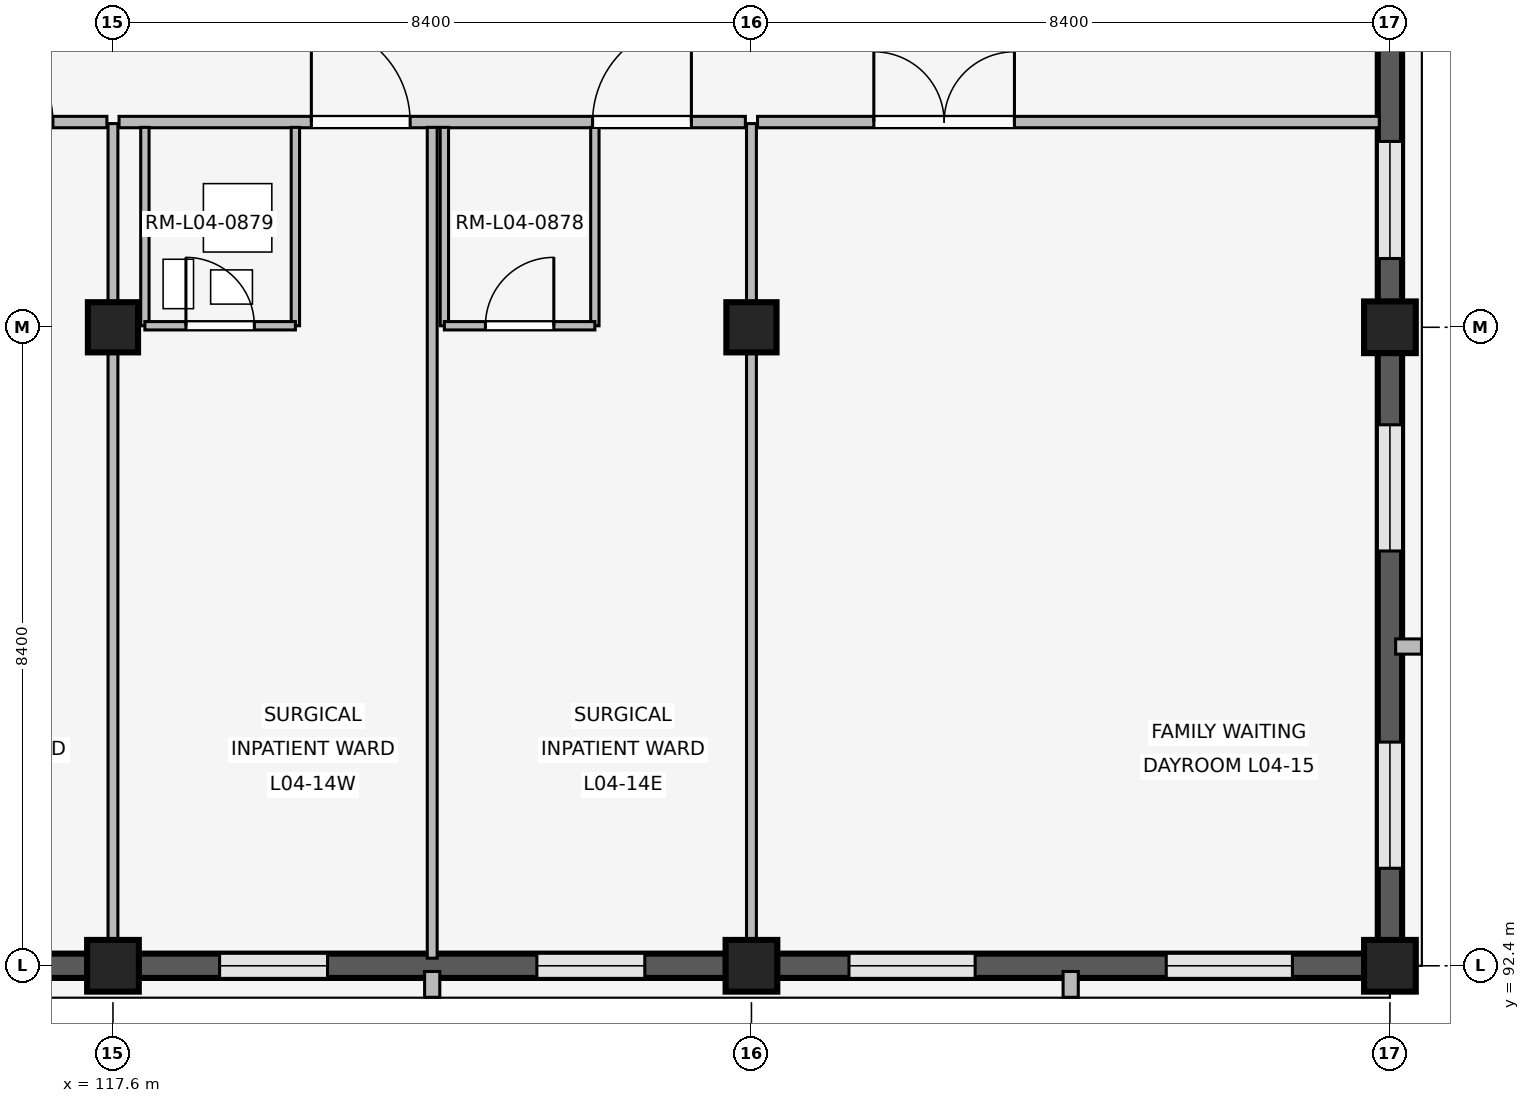
"""IFC4 building model, lengths in metres.
Left out: names, types, materials, properties, quantities, classifications, styles, units other than length and angle.
Written with IfcOpenShell. Run it as: python <this file> out.ifc"""

import sys

from ifc_helpers import new_model, si_unit, direction, frame, frame_2d, origin, origin_2d, place, context, subcontext, project, spatial, rectangle, extrude, element, fill, save


model = new_model("IFC4")
c1 = context("Model", 3, precision=1e-05, world=origin(), true_north=direction((0.0, 1.0)))
c2 = subcontext(c1, "Body", "Model", "MODEL_VIEW")
j1 = project(units=[si_unit("LENGTHUNIT", "METRE"), si_unit("PLANEANGLEUNIT", "RADIAN")], contexts=[c1])
p1 = place(None, origin())
s1 = spatial("IfcSite", under=j1, at=p1, CompositionType="ELEMENT")
p2 = place(p1, origin())
s2 = spatial("IfcBuilding", under=s1, at=p2, CompositionType="ELEMENT")
p3 = place(p2, frame((0.0, 0.0, 16.2)))
s3 = spatial("IfcBuildingStorey", under=s2, at=p3, CompositionType="ELEMENT", Elevation=16.2)
p4 = place(p3, frame((117.6, 92.4, 0.0), z_axis=(0.0, 0.0, 1.0), x_axis=(1.0, 0.0, 0.0)))
e1 = element("IfcColumn", 1, at=p4, inside=s3, PredefinedType="COLUMN", context=c2, shape_type="SweptSolid", body=[
    extrude(rectangle(XDim=0.68, YDim=0.68, at=origin_2d()), origin(), (0.0, 0.0, 1.0), 4.2),
])
p5 = place(p3, frame((117.6, 100.8, 0.0), z_axis=(0.0, 0.0, 1.0), x_axis=(1.0, 0.0, 0.0)))
e2 = element("IfcColumn", 2, at=p5, inside=s3, PredefinedType="COLUMN", context=c2, shape_type="SweptSolid", body=[
    extrude(rectangle(XDim=0.66, YDim=0.66, at=origin_2d()), origin(), (0.0, 0.0, 1.0), 4.2),
])
p6 = place(p3, frame((126.0, 92.4, 0.0), z_axis=(0.0, 0.0, 1.0), x_axis=(1.0, 0.0, 0.0)))
e3 = element("IfcColumn", 3, at=p6, inside=s3, PredefinedType="COLUMN", context=c2, shape_type="SweptSolid", body=[
    extrude(rectangle(XDim=0.68, YDim=0.68, at=origin_2d()), origin(), (0.0, 0.0, 1.0), 4.2),
])
p7 = place(p3, frame((126.0, 100.8, 0.0), z_axis=(0.0, 0.0, 1.0), x_axis=(1.0, 0.0, 0.0)))
e4 = element("IfcColumn", 4, at=p7, inside=s3, PredefinedType="COLUMN", context=c2, shape_type="SweptSolid", body=[
    extrude(rectangle(XDim=0.66, YDim=0.66, at=origin_2d()), origin(), (0.0, 0.0, 1.0), 4.2),
])
for number, where, z_axis, x_axis in (
    (5, (134.4, 92.4, 0.0), (0.0, 0.0, 1.0), (1.0, 0.0, 0.0)),
    (6, (134.4, 100.8, 0.0), (0.0, 0.0, 1.0), (1.0, 0.0, 0.0)),
):
    element("IfcColumn", number, at=place(p3, frame(where, z_axis=z_axis, x_axis=x_axis)), inside=s3, PredefinedType="COLUMN", context=c2, shape_type="SweptSolid", body=[
        extrude(rectangle(XDim=0.68, YDim=0.68, at=origin_2d()), origin(), (0.0, 0.0, 1.0), 4.2),
    ])
p8 = place(p3, frame((117.265, 92.4, 0.0), z_axis=(0.0, 0.0, 1.0), x_axis=(-1.0, 0.0, 0.0)))
e7 = element("IfcWall", 7, at=p8, inside=s3, PredefinedType="SOLIDWALL", context=c2, shape_type="SweptSolid", body=[
    extrude(rectangle(XDim=7.73, YDim=0.32, at=frame_2d((3.865, 0.0))), origin(), (0.0, 0.0, 1.0), 3.32),
])
p9 = place(p8, frame((1.038, 0.0, 0.85)))
e8 = element("IfcOpeningElement", 8, at=p9, cuts=e7, PredefinedType="OPENING", context=c2, shape_type="SweptSolid", body=[
    extrude(rectangle(XDim=1.48, YDim=1.6, at=frame_2d((0.74, 0.8))), frame((0.0, 0.17, 0.0), z_axis=(0.0, -1.0, 0.0), x_axis=(1.0, 0.0, 0.0)), (0.0, 0.0, 1.0), 0.34),
])
p10 = place(p8, frame((5.212, 0.0, 0.85)))
e9 = element("IfcOpeningElement", 9, at=p10, cuts=e7, PredefinedType="OPENING", context=c2, shape_type="SweptSolid", body=[
    extrude(rectangle(XDim=1.48, YDim=1.6, at=frame_2d((0.74, 0.8))), frame((0.0, 0.17, 0.0), z_axis=(0.0, -1.0, 0.0), x_axis=(1.0, 0.0, 0.0)), (0.0, 0.0, 1.0), 0.34),
])
p11 = place(p3, frame((125.665, 92.4, 0.0), z_axis=(0.0, 0.0, 1.0), x_axis=(-1.0, 0.0, 0.0)))
e10 = element("IfcWall", 10, at=p11, inside=s3, PredefinedType="SOLIDWALL", context=c2, shape_type="SweptSolid", body=[
    extrude(rectangle(XDim=7.73, YDim=0.32, at=frame_2d((3.865, 0.0))), origin(), (0.0, 0.0, 1.0), 3.32),
])
p12 = place(p11, frame((1.068, 0.0, 0.85)))
e11 = element("IfcOpeningElement", 11, at=p12, cuts=e10, PredefinedType="OPENING", context=c2, shape_type="SweptSolid", body=[
    extrude(rectangle(XDim=1.42, YDim=1.45, at=frame_2d((0.71, 0.725))), frame((0.0, 0.17, 0.0), z_axis=(0.0, -1.0, 0.0), x_axis=(1.0, 0.0, 0.0)), (0.0, 0.0, 1.0), 0.34),
])
p13 = place(p11, frame((5.242, 0.0, 0.85)))
e12 = element("IfcOpeningElement", 12, at=p13, cuts=e10, PredefinedType="OPENING", context=c2, shape_type="SweptSolid", body=[
    extrude(rectangle(XDim=1.42, YDim=1.45, at=frame_2d((0.71, 0.725))), frame((0.0, 0.17, 0.0), z_axis=(0.0, -1.0, 0.0), x_axis=(1.0, 0.0, 0.0)), (0.0, 0.0, 1.0), 0.34),
])
p14 = place(p3, frame((121.8, 92.325, 0.0), z_axis=(0.0, 0.0, 1.0), x_axis=(0.0, -1.0, 0.0)))
e13 = element("IfcWall", 13, at=p14, inside=s3, PredefinedType="ELEMENTEDWALL", context=c2, shape_type="SweptSolid", body=[
    extrude(rectangle(XDim=0.34, YDim=0.2, at=frame_2d((0.17, 0.0))), origin(), (0.0, 0.0, 1.0), 3.3),
])
p15 = place(p3, frame((134.065, 92.4, 0.0), z_axis=(0.0, 0.0, 1.0), x_axis=(-1.0, 0.0, 0.0)))
e14 = element("IfcWall", 14, at=p15, inside=s3, PredefinedType="SOLIDWALL", context=c2, shape_type="SweptSolid", body=[
    extrude(rectangle(XDim=7.73, YDim=0.32, at=frame_2d((3.865, 0.0))), origin(), (0.0, 0.0, 1.0), 3.32),
])
p16 = place(p15, frame((0.948, 0.0, 0.85)))
e15 = element("IfcOpeningElement", 15, at=p16, cuts=e14, PredefinedType="OPENING", context=c2, shape_type="SweptSolid", body=[
    extrude(rectangle(XDim=1.66, YDim=1.95, at=frame_2d((0.83, 0.975))), frame((0.0, 0.17, 0.0), z_axis=(0.0, -1.0, 0.0), x_axis=(1.0, 0.0, 0.0)), (0.0, 0.0, 1.0), 0.34),
])
p17 = place(p15, frame((5.122, 0.0, 0.85)))
e16 = element("IfcOpeningElement", 16, at=p17, cuts=e14, PredefinedType="OPENING", context=c2, shape_type="SweptSolid", body=[
    extrude(rectangle(XDim=1.66, YDim=1.95, at=frame_2d((0.83, 0.975))), frame((0.0, 0.17, 0.0), z_axis=(0.0, -1.0, 0.0), x_axis=(1.0, 0.0, 0.0)), (0.0, 0.0, 1.0), 0.34),
])
p18 = place(p3, frame((130.2, 92.325, 0.0), z_axis=(0.0, 0.0, 1.0), x_axis=(0.0, -1.0, 0.0)))
e17 = element("IfcWall", 17, at=p18, inside=s3, PredefinedType="ELEMENTEDWALL", context=c2, shape_type="SweptSolid", body=[
    extrude(rectangle(XDim=0.34, YDim=0.2, at=frame_2d((0.17, 0.0))), origin(), (0.0, 0.0, 1.0), 3.3),
])
p19 = place(p3, frame((134.4, 100.465, 0.0), z_axis=(0.0, 0.0, 1.0), x_axis=(0.0, -1.0, 0.0)))
e18 = element("IfcWall", 18, at=p19, inside=s3, PredefinedType="SOLIDWALL", context=c2, shape_type="SweptSolid", body=[
    extrude(rectangle(XDim=7.73, YDim=0.32, at=frame_2d((3.865, 0.0))), origin(), (0.0, 0.0, 1.0), 3.32),
])
p20 = place(p19, frame((0.948, 0.0, 0.85)))
e19 = element("IfcOpeningElement", 19, at=p20, cuts=e18, PredefinedType="OPENING", context=c2, shape_type="SweptSolid", body=[
    extrude(rectangle(XDim=1.66, YDim=1.95, at=frame_2d((0.83, 0.975))), frame((0.0, 0.17, 0.0), z_axis=(0.0, -1.0, 0.0), x_axis=(1.0, 0.0, 0.0)), (0.0, 0.0, 1.0), 0.34),
])
p21 = place(p19, frame((5.122, 0.0, 0.85)))
e20 = element("IfcOpeningElement", 20, at=p21, cuts=e18, PredefinedType="OPENING", context=c2, shape_type="SweptSolid", body=[
    extrude(rectangle(XDim=1.66, YDim=1.95, at=frame_2d((0.83, 0.975))), frame((0.0, 0.17, 0.0), z_axis=(0.0, -1.0, 0.0), x_axis=(1.0, 0.0, 0.0)), (0.0, 0.0, 1.0), 0.34),
])
p22 = place(p3, frame((134.475, 96.6, 0.0), z_axis=(0.0, 0.0, 1.0), x_axis=(1.0, 0.0, 0.0)))
e21 = element("IfcWall", 21, at=p22, inside=s3, PredefinedType="ELEMENTEDWALL", context=c2, shape_type="SweptSolid", body=[
    extrude(rectangle(XDim=0.34, YDim=0.2, at=frame_2d((0.17, 0.0))), origin(), (0.0, 0.0, 1.0), 3.3),
])
p23 = place(p3, frame((134.4, 108.865, 0.0), z_axis=(0.0, 0.0, 1.0), x_axis=(0.0, -1.0, 0.0)))
e22 = element("IfcWall", 22, at=p23, inside=s3, PredefinedType="SOLIDWALL", context=c2, shape_type="SweptSolid", body=[
    extrude(rectangle(XDim=7.73, YDim=0.32, at=frame_2d((3.865, 0.0))), origin(), (0.0, 0.0, 1.0), 3.32),
])
p24 = place(p23, frame((0.57, 0.0, 0.85)))
e23 = element("IfcOpeningElement", 23, at=p24, cuts=e22, PredefinedType="OPENING", context=c2, shape_type="SweptSolid", body=[
    extrude(rectangle(XDim=1.54, YDim=1.85, at=frame_2d((0.77, 0.925))), frame((0.0, 0.17, 0.0), z_axis=(0.0, -1.0, 0.0), x_axis=(1.0, 0.0, 0.0)), (0.0, 0.0, 1.0), 0.34),
])
p25 = place(p23, frame((5.62, 0.0, 0.85)))
e24 = element("IfcOpeningElement", 24, at=p25, cuts=e22, PredefinedType="OPENING", context=c2, shape_type="SweptSolid", body=[
    extrude(rectangle(XDim=1.54, YDim=1.85, at=frame_2d((0.77, 0.925))), frame((0.0, 0.17, 0.0), z_axis=(0.0, -1.0, 0.0), x_axis=(1.0, 0.0, 0.0)), (0.0, 0.0, 1.0), 0.34),
])
p26 = place(p3, frame((109.28, 103.5, 0.0), z_axis=(0.0, 0.0, 1.0), x_axis=(1.0, 0.0, 0.0)))
e25 = element("IfcWall", 25, at=p26, inside=s3, PredefinedType="PARTITIONING", context=c2, shape_type="SweptSolid", body=[
    extrude(rectangle(XDim=8.24, YDim=0.15, at=frame_2d((4.12, 0.0))), origin(), (0.0, 0.0, 1.0), 3.3),
])
p27 = place(p26, frame((2.53, 0.0, 0.0)))
e26 = element("IfcOpeningElement", 26, at=p27, cuts=e25, PredefinedType="OPENING", context=c2, shape_type="SweptSolid", body=[
    extrude(rectangle(XDim=1.3, YDim=2.25, at=frame_2d((0.65, 1.125))), frame((0.0, 0.085, 0.0), z_axis=(0.0, -1.0, 0.0), x_axis=(1.0, 0.0, 0.0)), (0.0, 0.0, 1.0), 0.17),
])
p28 = place(p26, frame((6.23, 0.0, 0.0)))
e27 = element("IfcOpeningElement", 27, at=p28, cuts=e25, PredefinedType="OPENING", context=c2, shape_type="SweptSolid", body=[
    extrude(rectangle(XDim=1.3, YDim=2.25, at=frame_2d((0.65, 1.125))), frame((0.0, 0.085, 0.0), z_axis=(0.0, -1.0, 0.0), x_axis=(1.0, 0.0, 0.0)), (0.0, 0.0, 1.0), 0.17),
])
p29 = place(p3, frame((117.6, 92.54, 0.0), z_axis=(0.0, 0.0, 1.0), x_axis=(0.0, 1.0, 0.0)))
e28 = element("IfcWall", 28, at=p29, inside=s3, PredefinedType="PARTITIONING", context=c2, shape_type="SweptSolid", body=[
    extrude(rectangle(XDim=10.94, YDim=0.13, at=frame_2d((5.47, 0.0))), origin(), (0.0, 0.0, 1.0), 3.3),
])
p30 = place(p3, frame((117.68, 103.5, 0.0), z_axis=(0.0, 0.0, 1.0), x_axis=(1.0, 0.0, 0.0)))
e29 = element("IfcWall", 29, at=p30, inside=s3, PredefinedType="PARTITIONING", context=c2, shape_type="SweptSolid", body=[
    extrude(rectangle(XDim=8.24, YDim=0.15, at=frame_2d((4.12, 0.0))), origin(), (0.0, 0.0, 1.0), 3.3),
])
p31 = place(p30, frame((2.53, 0.0, 0.0)))
e30 = element("IfcOpeningElement", 30, at=p31, cuts=e29, PredefinedType="OPENING", context=c2, shape_type="SweptSolid", body=[
    extrude(rectangle(XDim=1.3, YDim=2.25, at=frame_2d((0.65, 1.125))), frame((0.0, 0.085, 0.0), z_axis=(0.0, -1.0, 0.0), x_axis=(1.0, 0.0, 0.0)), (0.0, 0.0, 1.0), 0.17),
])
p32 = place(p30, frame((6.23, 0.0, 0.0)))
e31 = element("IfcOpeningElement", 31, at=p32, cuts=e29, PredefinedType="OPENING", context=c2, shape_type="SweptSolid", body=[
    extrude(rectangle(XDim=1.3, YDim=2.25, at=frame_2d((0.65, 1.125))), frame((0.0, 0.085, 0.0), z_axis=(0.0, -1.0, 0.0), x_axis=(1.0, 0.0, 0.0)), (0.0, 0.0, 1.0), 0.17),
])
p33 = place(p3, frame((121.8, 92.5, 0.0), z_axis=(0.0, 0.0, 1.0), x_axis=(0.0, 1.0, 0.0)))
e32 = element("IfcWall", 32, at=p33, inside=s3, PredefinedType="PARTITIONING", context=c2, shape_type="SweptSolid", body=[
    extrude(rectangle(XDim=10.93, YDim=0.13, at=frame_2d((5.465, 0.0))), origin(), (0.0, 0.0, 1.0), 3.3),
])
for number, where, z_axis, x_axis in (
    (33, (118.02, 100.82, 0.0), (0.0, 0.0, 1.0), (0.0, 1.0, 0.0)),
    (34, (120.0, 100.82, 0.0), (0.0, 0.0, 1.0), (0.0, 1.0, 0.0)),
):
    element("IfcWall", number, at=place(p3, frame(where, z_axis=z_axis, x_axis=x_axis)), inside=s3, PredefinedType="PARTITIONING", context=c2, shape_type="SweptSolid", body=[
        extrude(rectangle(XDim=2.61, YDim=0.11, at=frame_2d((1.305, 0.0))), origin(), (0.0, 0.0, 1.0), 3.3),
    ])
p34 = place(p3, frame((118.02, 100.82, 0.0), z_axis=(0.0, 0.0, 1.0), x_axis=(1.0, 0.0, 0.0)))
e35 = element("IfcWall", 35, at=p34, inside=s3, PredefinedType="PARTITIONING", context=c2, shape_type="SweptSolid", body=[
    extrude(rectangle(XDim=1.98, YDim=0.11, at=frame_2d((0.99, 0.0))), origin(), (0.0, 0.0, 1.0), 3.3),
])
p35 = place(p34, frame((0.54, 0.0, 0.0)))
e36 = element("IfcOpeningElement", 36, at=p35, cuts=e35, PredefinedType="OPENING", context=c2, shape_type="SweptSolid", body=[
    extrude(rectangle(XDim=0.9, YDim=2.1, at=frame_2d((0.45, 1.05))), frame((0.0, 0.065, 0.0), z_axis=(0.0, -1.0, 0.0), x_axis=(1.0, 0.0, 0.0)), (0.0, 0.0, 1.0), 0.13),
])
for number, where, z_axis, x_axis in (
    (37, (121.96, 100.82, 0.0), (0.0, 0.0, 1.0), (0.0, 1.0, 0.0)),
    (38, (123.94, 100.82, 0.0), (0.0, 0.0, 1.0), (0.0, 1.0, 0.0)),
):
    element("IfcWall", number, at=place(p3, frame(where, z_axis=z_axis, x_axis=x_axis)), inside=s3, PredefinedType="PARTITIONING", context=c2, shape_type="SweptSolid", body=[
        extrude(rectangle(XDim=2.61, YDim=0.11, at=frame_2d((1.305, 0.0))), origin(), (0.0, 0.0, 1.0), 3.3),
    ])
p36 = place(p3, frame((121.96, 100.82, 0.0), z_axis=(0.0, 0.0, 1.0), x_axis=(1.0, 0.0, 0.0)))
e39 = element("IfcWall", 39, at=p36, inside=s3, PredefinedType="PARTITIONING", context=c2, shape_type="SweptSolid", body=[
    extrude(rectangle(XDim=1.98, YDim=0.11, at=frame_2d((0.99, 0.0))), origin(), (0.0, 0.0, 1.0), 3.3),
])
p37 = place(p36, frame((0.54, 0.0, 0.0)))
e40 = element("IfcOpeningElement", 40, at=p37, cuts=e39, PredefinedType="OPENING", context=c2, shape_type="SweptSolid", body=[
    extrude(rectangle(XDim=0.9, YDim=2.1, at=frame_2d((0.45, 1.05))), frame((0.0, 0.065, 0.0), z_axis=(0.0, -1.0, 0.0), x_axis=(1.0, 0.0, 0.0)), (0.0, 0.0, 1.0), 0.13),
])
p38 = place(p3, frame((126.0, 92.54, 0.0), z_axis=(0.0, 0.0, 1.0), x_axis=(0.0, 1.0, 0.0)))
e41 = element("IfcWall", 41, at=p38, inside=s3, PredefinedType="PARTITIONING", context=c2, shape_type="SweptSolid", body=[
    extrude(rectangle(XDim=10.94, YDim=0.13, at=frame_2d((5.47, 0.0))), origin(), (0.0, 0.0, 1.0), 3.3),
])
p39 = place(p3, frame((126.08, 103.5, 0.0), z_axis=(0.0, 0.0, 1.0), x_axis=(1.0, 0.0, 0.0)))
e42 = element("IfcWall", 42, at=p39, inside=s3, PredefinedType="PARTITIONING", context=c2, shape_type="SweptSolid", body=[
    extrude(rectangle(XDim=8.18, YDim=0.15, at=frame_2d((4.09, 0.0))), origin(), (0.0, 0.0, 1.0), 3.3),
])
p40 = place(p39, frame((1.53, 0.0, 0.0)))
e43 = element("IfcOpeningElement", 43, at=p40, cuts=e42, PredefinedType="OPENING", context=c2, shape_type="SweptSolid", body=[
    extrude(rectangle(XDim=1.85, YDim=2.3, at=frame_2d((0.925, 1.15))), frame((0.0, 0.085, 0.0), z_axis=(0.0, -1.0, 0.0), x_axis=(1.0, 0.0, 0.0)), (0.0, 0.0, 1.0), 0.17),
])
p41 = place(p12, origin())
e44 = element("IfcWindow", 44, at=p41, inside=s3, PartitioningType="SINGLE_PANEL", PredefinedType="WINDOW", context=c2, shape_type="SweptSolid", body=[
    extrude(rectangle(XDim=1.42, YDim=1.45, at=frame_2d((0.71, 0.725))), frame((0.0, 0.03, 0.0), z_axis=(0.0, -1.0, 0.0), x_axis=(1.0, 0.0, 0.0)), (0.0, 0.0, 1.0), 0.06),
])
fill(e11, e44)
p42 = place(p13, origin())
e45 = element("IfcWindow", 45, at=p42, inside=s3, PartitioningType="SINGLE_PANEL", PredefinedType="WINDOW", context=c2, shape_type="SweptSolid", body=[
    extrude(rectangle(XDim=1.42, YDim=1.45, at=frame_2d((0.71, 0.725))), frame((0.0, 0.03, 0.0), z_axis=(0.0, -1.0, 0.0), x_axis=(1.0, 0.0, 0.0)), (0.0, 0.0, 1.0), 0.06),
])
fill(e12, e45)
p43 = place(p16, origin())
e46 = element("IfcWindow", 46, at=p43, inside=s3, PartitioningType="SINGLE_PANEL", PredefinedType="WINDOW", context=c2, shape_type="SweptSolid", body=[
    extrude(rectangle(XDim=1.66, YDim=1.95, at=frame_2d((0.83, 0.975))), frame((0.0, 0.03, 0.0), z_axis=(0.0, -1.0, 0.0), x_axis=(1.0, 0.0, 0.0)), (0.0, 0.0, 1.0), 0.06),
])
fill(e15, e46)
p44 = place(p17, origin())
e47 = element("IfcWindow", 47, at=p44, inside=s3, PartitioningType="SINGLE_PANEL", PredefinedType="WINDOW", context=c2, shape_type="SweptSolid", body=[
    extrude(rectangle(XDim=1.66, YDim=1.95, at=frame_2d((0.83, 0.975))), frame((0.0, 0.03, 0.0), z_axis=(0.0, -1.0, 0.0), x_axis=(1.0, 0.0, 0.0)), (0.0, 0.0, 1.0), 0.06),
])
fill(e16, e47)
p45 = place(p20, origin())
e48 = element("IfcWindow", 48, at=p45, inside=s3, PartitioningType="SINGLE_PANEL", PredefinedType="WINDOW", context=c2, shape_type="SweptSolid", body=[
    extrude(rectangle(XDim=1.66, YDim=1.95, at=frame_2d((0.83, 0.975))), frame((0.0, 0.03, 0.0), z_axis=(0.0, -1.0, 0.0), x_axis=(1.0, 0.0, 0.0)), (0.0, 0.0, 1.0), 0.06),
])
fill(e19, e48)
p46 = place(p21, origin())
e49 = element("IfcWindow", 49, at=p46, inside=s3, PartitioningType="SINGLE_PANEL", PredefinedType="WINDOW", context=c2, shape_type="SweptSolid", body=[
    extrude(rectangle(XDim=1.66, YDim=1.95, at=frame_2d((0.83, 0.975))), frame((0.0, 0.03, 0.0), z_axis=(0.0, -1.0, 0.0), x_axis=(1.0, 0.0, 0.0)), (0.0, 0.0, 1.0), 0.06),
])
fill(e20, e49)
p47 = place(p25, origin())
e50 = element("IfcWindow", 50, at=p47, inside=s3, PartitioningType="SINGLE_PANEL", PredefinedType="WINDOW", context=c2, shape_type="SweptSolid", body=[
    extrude(rectangle(XDim=1.54, YDim=1.85, at=frame_2d((0.77, 0.925))), frame((0.0, 0.03, 0.0), z_axis=(0.0, -1.0, 0.0), x_axis=(1.0, 0.0, 0.0)), (0.0, 0.0, 1.0), 0.06),
])
fill(e24, e50)
p48 = place(p28, origin())
e51 = element("IfcDoor", 51, at=p48, inside=s3, OperationType="SINGLE_SWING_LEFT", PredefinedType="DOOR", context=c2, shape_type="SweptSolid", body=[
    extrude(rectangle(XDim=1.3, YDim=2.25, at=frame_2d((0.65, 1.125))), frame((0.0, 0.025, 0.0), z_axis=(0.0, -1.0, 0.0), x_axis=(1.0, 0.0, 0.0)), (0.0, 0.0, 1.0), 0.05),
])
fill(e27, e51)
p49 = place(p31, origin())
e52 = element("IfcDoor", 52, at=p49, inside=s3, OperationType="SINGLE_SWING_LEFT", PredefinedType="DOOR", context=c2, shape_type="SweptSolid", body=[
    extrude(rectangle(XDim=1.3, YDim=2.25, at=frame_2d((0.65, 1.125))), frame((0.0, 0.025, 0.0), z_axis=(0.0, -1.0, 0.0), x_axis=(1.0, 0.0, 0.0)), (0.0, 0.0, 1.0), 0.05),
])
fill(e30, e52)
p50 = place(p32, origin())
e53 = element("IfcDoor", 53, at=p50, inside=s3, OperationType="SINGLE_SWING_RIGHT", PredefinedType="DOOR", context=c2, shape_type="SweptSolid", body=[
    extrude(rectangle(XDim=1.3, YDim=2.25, at=frame_2d((0.65, 1.125))), frame((0.0, 0.025, 0.0), z_axis=(0.0, -1.0, 0.0), x_axis=(1.0, 0.0, 0.0)), (0.0, 0.0, 1.0), 0.05),
])
fill(e31, e53)
p51 = place(p35, origin())
e54 = element("IfcDoor", 54, at=p51, inside=s3, OperationType="SINGLE_SWING_LEFT", PredefinedType="DOOR", context=c2, shape_type="SweptSolid", body=[
    extrude(rectangle(XDim=0.9, YDim=2.1, at=frame_2d((0.45, 1.05))), frame((0.0, 0.025, 0.0), z_axis=(0.0, -1.0, 0.0), x_axis=(1.0, 0.0, 0.0)), (0.0, 0.0, 1.0), 0.05),
])
fill(e36, e54)
p52 = place(p37, origin())
e55 = element("IfcDoor", 55, at=p52, inside=s3, OperationType="SINGLE_SWING_RIGHT", PredefinedType="DOOR", context=c2, shape_type="SweptSolid", body=[
    extrude(rectangle(XDim=0.9, YDim=2.1, at=frame_2d((0.45, 1.05))), frame((0.0, 0.025, 0.0), z_axis=(0.0, -1.0, 0.0), x_axis=(1.0, 0.0, 0.0)), (0.0, 0.0, 1.0), 0.05),
])
fill(e40, e55)
p53 = place(p40, origin())
e56 = element("IfcDoor", 56, at=p53, inside=s3, OperationType="DOUBLE_SWING_LEFT", PredefinedType="DOOR", context=c2, shape_type="SweptSolid", body=[
    extrude(rectangle(XDim=1.85, YDim=2.3, at=frame_2d((0.925, 1.15))), frame((0.0, 0.025, 0.0), z_axis=(0.0, -1.0, 0.0), x_axis=(1.0, 0.0, 0.0)), (0.0, 0.0, 1.0), 0.05),
])
fill(e43, e56)
save(model, sys.argv[1])
